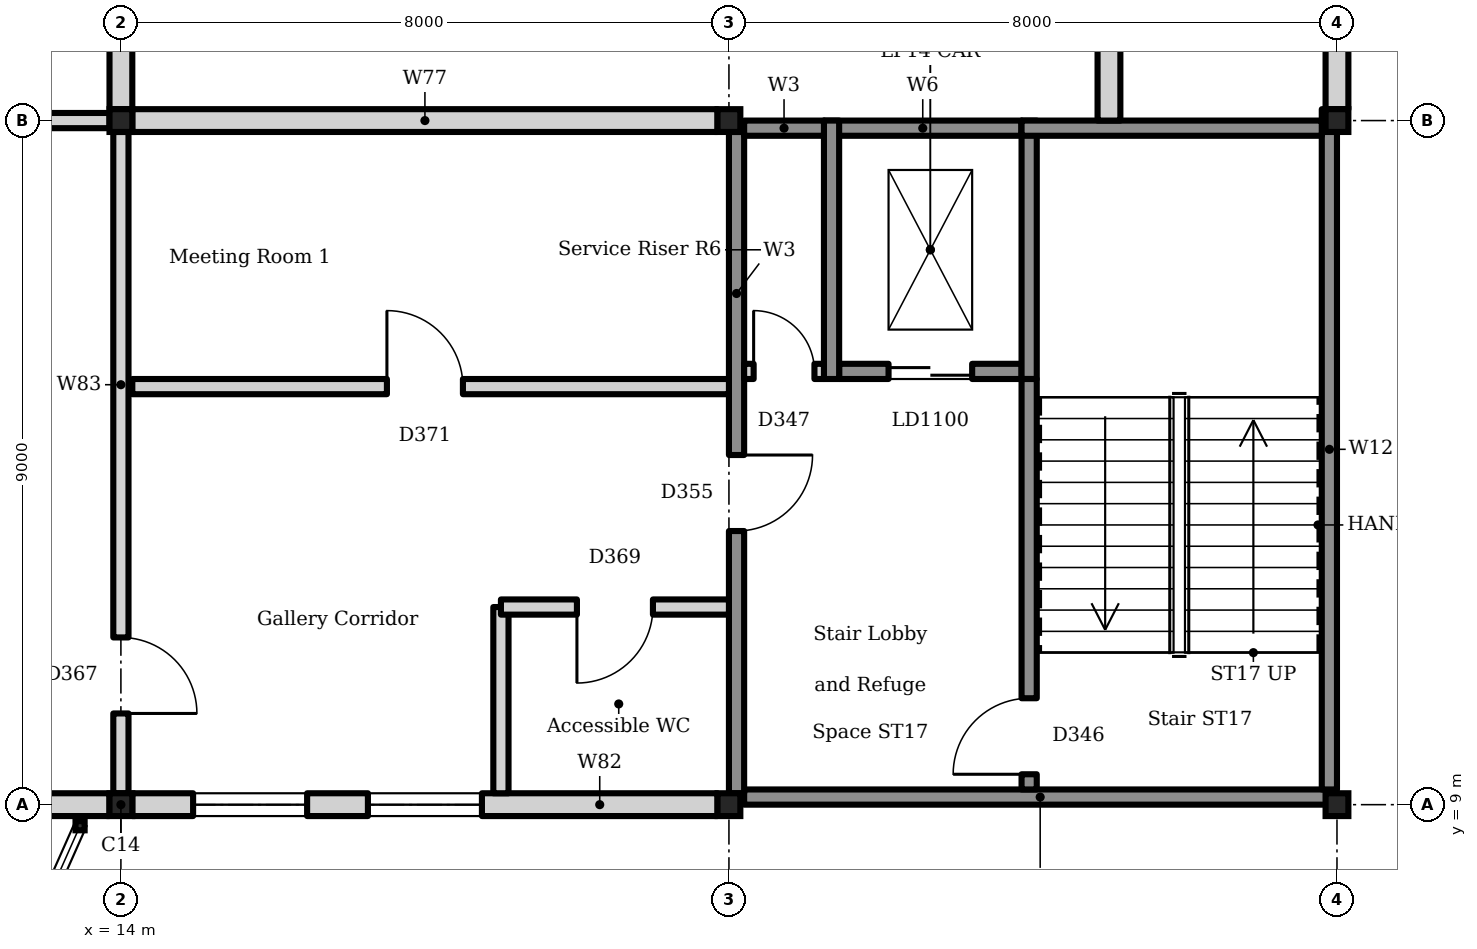
"""IFC4 building model, lengths in metres.
Left out: names, types, materials, properties, quantities, classifications, styles, units other than length and angle.
Written with IfcOpenShell. Run it as: python <this file> out.ifc"""

import sys

from ifc_helpers import new_model, si_unit, direction, frame, frame_2d, origin, origin_2d, place, context, subcontext, project, spatial, rectangle, i_section, extrude, element, fill, save


model = new_model("IFC4")
c1 = context("Model", 3, precision=1e-05, world=origin(), true_north=direction((0.0, 1.0)))
c2 = subcontext(c1, "Body", "Model", "MODEL_VIEW")
j1 = project(units=[si_unit("LENGTHUNIT", "METRE"), si_unit("PLANEANGLEUNIT", "RADIAN")], contexts=[c1])
p1 = place(None, origin())
s1 = spatial("IfcSite", under=j1, at=p1, CompositionType="ELEMENT")
p2 = place(p1, origin())
s2 = spatial("IfcBuilding", under=s1, at=p2, CompositionType="ELEMENT")
p3 = place(p2, frame((0.0, 0.0, 5.4)))
s3 = spatial("IfcBuildingStorey", under=s2, at=p3, CompositionType="ELEMENT", Elevation=5.4)
p4 = place(p3, frame((23.25, 17.9, 0.0), z_axis=(0.0, 0.0, 1.0), x_axis=(1.0, 0.0, 0.0)))
e1 = element("IfcWall", 1, at=p4, inside=s3, PredefinedType="SOLIDWALL", context=c2, shape_type="SweptSolid", body=[
    extrude(rectangle(XDim=2.6, YDim=0.2, at=frame_2d((1.3, 0.0))), origin(), (0.0, 0.0, 1.0), 4.5),
])
p5 = place(p3, frame((23.45, 14.7, 0.0), z_axis=(0.0, 0.0, 1.0), x_axis=(1.0, 0.0, 0.0)))
e2 = element("IfcWall", 2, at=p5, inside=s3, PredefinedType="SOLIDWALL", context=c2, shape_type="SweptSolid", body=[
    extrude(rectangle(XDim=2.4, YDim=0.2, at=frame_2d((1.2, 0.0))), origin(), (0.0, 0.0, 1.0), 4.5),
])
p6 = place(p5, frame((0.65, 0.0, 0.0)))
e3 = element("IfcOpeningElement", 3, at=p6, cuts=e2, PredefinedType="OPENING", context=c2, shape_type="SweptSolid", body=[
    extrude(rectangle(XDim=1.1, YDim=2.1, at=frame_2d((0.55, 1.05))), frame((0.0, 0.11, 0.0), z_axis=(0.0, -1.0, 0.0), x_axis=(1.0, 0.0, 0.0)), (0.0, 0.0, 1.0), 0.22),
])
for number, where, z_axis, x_axis in (
    (4, (23.35, 14.6, 0.0), (0.0, 0.0, 1.0), (0.0, 1.0, 0.0)),
    (5, (25.95, 14.6, 0.0), (0.0, 0.0, 1.0), (0.0, 1.0, 0.0)),
):
    element("IfcWall", number, at=place(p3, frame(where, z_axis=z_axis, x_axis=x_axis)), inside=s3, PredefinedType="SOLIDWALL", context=c2, shape_type="SweptSolid", body=[
        extrude(rectangle(XDim=3.4, YDim=0.2, at=frame_2d((1.7, 0.0))), origin(), (0.0, 0.0, 1.0), 4.5),
    ])
for number, where, z_axis, x_axis in (
    (6, (14.0, 9.0, 0.0), (0.0, 0.0, 1.0), (1.0, 0.0, 0.0)),
    (7, (14.0, 18.0, 0.0), (0.0, 0.0, 1.0), (1.0, 0.0, 0.0)),
    (8, (22.0, 9.0, 0.0), (0.0, 0.0, 1.0), (1.0, 0.0, 0.0)),
    (9, (22.0, 18.0, 0.0), (0.0, 0.0, 1.0), (1.0, 0.0, 0.0)),
    (10, (30.0, 9.0, 0.0), (0.0, 0.0, 1.0), (1.0, 0.0, 0.0)),
    (11, (30.0, 18.0, 0.0), (0.0, 0.0, 1.0), (1.0, 0.0, 0.0)),
):
    element("IfcColumn", number, at=place(p3, frame(where, z_axis=z_axis, x_axis=x_axis)), inside=s3, PredefinedType="COLUMN", context=c2, shape_type="SweptSolid", body=[
        extrude(i_section(OverallWidth=0.3, OverallDepth=0.3, WebThickness=0.011, FlangeThickness=0.019, FilletRadius=0.027, at=origin_2d()), origin(), (0.0, 0.0, 1.0), 4.5),
    ])
p7 = place(p3, frame((6.15, 9.0, 0.0), z_axis=(0.0, 0.0, 1.0), x_axis=(1.0, 0.0, 0.0)))
e12 = element("IfcWall", 12, at=p7, inside=s3, PredefinedType="SOLIDWALL", context=c2, shape_type="SweptSolid", body=[
    extrude(rectangle(XDim=7.7, YDim=0.3, at=frame_2d((3.85, 0.0))), origin(), (0.0, 0.0, 1.0), 3.82),
])
p8 = place(p7, frame((0.8, 0.0, 0.9)))
e13 = element("IfcOpeningElement", 13, at=p8, cuts=e12, PredefinedType="OPENING", context=c2, shape_type="SweptSolid", body=[
    extrude(rectangle(XDim=1.5, YDim=2.8, at=frame_2d((0.75, 1.4))), frame((0.0, 0.16, 0.0), z_axis=(0.0, -1.0, 0.0), x_axis=(1.0, 0.0, 0.0)), (0.0, 0.0, 1.0), 0.32),
])
p9 = place(p7, frame((3.1, 0.0, 0.9)))
e14 = element("IfcOpeningElement", 14, at=p9, cuts=e12, PredefinedType="OPENING", context=c2, shape_type="SweptSolid", body=[
    extrude(rectangle(XDim=1.5, YDim=2.8, at=frame_2d((0.75, 1.4))), frame((0.0, 0.16, 0.0), z_axis=(0.0, -1.0, 0.0), x_axis=(1.0, 0.0, 0.0)), (0.0, 0.0, 1.0), 0.32),
])
p10 = place(p7, frame((5.4, 0.0, 0.9)))
e15 = element("IfcOpeningElement", 15, at=p10, cuts=e12, PredefinedType="OPENING", context=c2, shape_type="SweptSolid", body=[
    extrude(rectangle(XDim=1.5, YDim=2.8, at=frame_2d((0.75, 1.4))), frame((0.0, 0.16, 0.0), z_axis=(0.0, -1.0, 0.0), x_axis=(1.0, 0.0, 0.0)), (0.0, 0.0, 1.0), 0.32),
])
p11 = place(p3, frame((14.15, 9.0, 0.0), z_axis=(0.0, 0.0, 1.0), x_axis=(1.0, 0.0, 0.0)))
e16 = element("IfcWall", 16, at=p11, inside=s3, PredefinedType="SOLIDWALL", context=c2, shape_type="SweptSolid", body=[
    extrude(rectangle(XDim=7.7, YDim=0.3, at=frame_2d((3.85, 0.0))), origin(), (0.0, 0.0, 1.0), 3.82),
])
p12 = place(p11, frame((0.8, 0.0, 0.9)))
e17 = element("IfcOpeningElement", 17, at=p12, cuts=e16, PredefinedType="OPENING", context=c2, shape_type="SweptSolid", body=[
    extrude(rectangle(XDim=1.5, YDim=2.8, at=frame_2d((0.75, 1.4))), frame((0.0, 0.16, 0.0), z_axis=(0.0, -1.0, 0.0), x_axis=(1.0, 0.0, 0.0)), (0.0, 0.0, 1.0), 0.32),
])
p13 = place(p11, frame((3.1, 0.0, 0.9)))
e18 = element("IfcOpeningElement", 18, at=p13, cuts=e16, PredefinedType="OPENING", context=c2, shape_type="SweptSolid", body=[
    extrude(rectangle(XDim=1.5, YDim=2.8, at=frame_2d((0.75, 1.4))), frame((0.0, 0.16, 0.0), z_axis=(0.0, -1.0, 0.0), x_axis=(1.0, 0.0, 0.0)), (0.0, 0.0, 1.0), 0.32),
])
p14 = place(p3, frame((30.0, 18.15, 0.0), z_axis=(0.0, 0.0, 1.0), x_axis=(0.0, 1.0, 0.0)))
e19 = element("IfcWall", 19, at=p14, inside=s3, PredefinedType="SOLIDWALL", context=c2, shape_type="SweptSolid", body=[
    extrude(rectangle(XDim=8.7, YDim=0.3, at=frame_2d((4.35, 0.0))), origin(), (0.0, 0.0, 1.0), 3.72),
])
p15 = place(p14, frame((1.05, 0.0, 1.4)))
e20 = element("IfcOpeningElement", 20, at=p15, cuts=e19, PredefinedType="OPENING", context=c2, shape_type="SweptSolid", body=[
    extrude(rectangle(XDim=1.5, YDim=2.0, at=frame_2d((0.75, 1.0))), frame((0.0, 0.16, 0.0), z_axis=(0.0, -1.0, 0.0), x_axis=(1.0, 0.0, 0.0)), (0.0, 0.0, 1.0), 0.32),
])
p16 = place(p14, frame((3.6, 0.0, 1.4)))
e21 = element("IfcOpeningElement", 21, at=p16, cuts=e19, PredefinedType="OPENING", context=c2, shape_type="SweptSolid", body=[
    extrude(rectangle(XDim=1.5, YDim=2.0, at=frame_2d((0.75, 1.0))), frame((0.0, 0.16, 0.0), z_axis=(0.0, -1.0, 0.0), x_axis=(1.0, 0.0, 0.0)), (0.0, 0.0, 1.0), 0.32),
])
p17 = place(p14, frame((6.15, 0.0, 1.4)))
e22 = element("IfcOpeningElement", 22, at=p17, cuts=e19, PredefinedType="OPENING", context=c2, shape_type="SweptSolid", body=[
    extrude(rectangle(XDim=1.5, YDim=2.0, at=frame_2d((0.75, 1.0))), frame((0.0, 0.16, 0.0), z_axis=(0.0, -1.0, 0.0), x_axis=(1.0, 0.0, 0.0)), (0.0, 0.0, 1.0), 0.32),
])
p18 = place(p3, frame((14.0, 18.15, 0.0), z_axis=(0.0, 0.0, 1.0), x_axis=(0.0, 1.0, 0.0)))
e23 = element("IfcWall", 23, at=p18, inside=s3, PredefinedType="SOLIDWALL", context=c2, shape_type="SweptSolid", body=[
    extrude(rectangle(XDim=8.7, YDim=0.3, at=frame_2d((4.35, 0.0))), origin(), (0.0, 0.0, 1.0), 3.72),
])
p19 = place(p3, frame((14.15, 18.0, 0.0), z_axis=(0.0, 0.0, 1.0), x_axis=(1.0, 0.0, 0.0)))
e24 = element("IfcWall", 24, at=p19, inside=s3, PredefinedType="SOLIDWALL", context=c2, shape_type="SweptSolid", body=[
    extrude(rectangle(XDim=7.7, YDim=0.3, at=frame_2d((3.85, 0.0))), origin(), (0.0, 0.0, 1.0), 3.72),
])
p20 = place(p3, frame((27.0, 18.0, 0.0), z_axis=(0.0, 0.0, 1.0), x_axis=(0.0, 1.0, 0.0)))
e25 = element("IfcWall", 25, at=p20, inside=s3, PredefinedType="SOLIDWALL", context=c2, shape_type="SweptSolid", body=[
    extrude(rectangle(XDim=17.85, YDim=0.3, at=frame_2d((8.925, 0.0))), origin(), (0.0, 0.0, 1.0), 4.3),
])
p21 = place(p3, frame((22.2, 9.1, 0.0), z_axis=(0.0, 0.0, 1.0), x_axis=(1.0, 0.0, 0.0)))
e26 = element("IfcWall", 26, at=p21, inside=s3, PredefinedType="SOLIDWALL", context=c2, shape_type="SweptSolid", body=[
    extrude(rectangle(XDim=7.79, YDim=0.2, at=frame_2d((3.895, 0.0))), origin(), (0.0, 0.0, 1.0), 4.3),
])
p22 = place(p3, frame((29.9, 9.2, 0.0), z_axis=(0.0, 0.0, 1.0), x_axis=(0.0, 1.0, 0.0)))
e27 = element("IfcWall", 27, at=p22, inside=s3, PredefinedType="SOLIDWALL", context=c2, shape_type="SweptSolid", body=[
    extrude(rectangle(XDim=8.95, YDim=0.2, at=frame_2d((4.475, 0.0))), origin(), (0.0, 0.0, 1.0), 4.3),
])
p23 = place(p3, frame((22.1, 9.15, 0.0), z_axis=(0.0, 0.0, 1.0), x_axis=(0.0, 1.0, 0.0)))
e28 = element("IfcWall", 28, at=p23, inside=s3, PredefinedType="SOLIDWALL", context=c2, shape_type="SweptSolid", body=[
    extrude(rectangle(XDim=8.7, YDim=0.2, at=frame_2d((4.35, 0.0))), origin(), (0.0, 0.0, 1.0), 4.3),
])
p24 = place(p23, frame((3.45, 0.0, 0.0)))
e29 = element("IfcOpeningElement", 29, at=p24, cuts=e28, PredefinedType="OPENING", context=c2, shape_type="SweptSolid", body=[
    extrude(rectangle(XDim=1.0, YDim=2.1, at=frame_2d((0.5, 1.05))), frame((0.0, 0.11, 0.0), z_axis=(0.0, -1.0, 0.0), x_axis=(1.0, 0.0, 0.0)), (0.0, 0.0, 1.0), 0.22),
])
p25 = place(p3, frame((22.2, 17.9, 0.0), z_axis=(0.0, 0.0, 1.0), x_axis=(1.0, 0.0, 0.0)))
e30 = element("IfcWall", 30, at=p25, inside=s3, PredefinedType="SOLIDWALL", context=c2, shape_type="SweptSolid", body=[
    extrude(rectangle(XDim=1.05, YDim=0.2, at=frame_2d((0.525, 0.0))), origin(), (0.0, 0.0, 1.0), 4.3),
])
p26 = place(p3, frame((25.85, 17.9, 0.0), z_axis=(0.0, 0.0, 1.0), x_axis=(1.0, 0.0, 0.0)))
e31 = element("IfcWall", 31, at=p26, inside=s3, PredefinedType="SOLIDWALL", context=c2, shape_type="SweptSolid", body=[
    extrude(rectangle(XDim=3.95, YDim=0.2, at=frame_2d((1.975, 0.0))), origin(), (0.0, 0.0, 1.0), 4.3),
])
p27 = place(p3, frame((25.95, 9.2, 0.0), z_axis=(0.0, 0.0, 1.0), x_axis=(0.0, 1.0, 0.0)))
e32 = element("IfcWall", 32, at=p27, inside=s3, PredefinedType="SOLIDWALL", context=c2, shape_type="SweptSolid", body=[
    extrude(rectangle(XDim=5.4, YDim=0.2, at=frame_2d((2.7, 0.0))), origin(), (0.0, 0.0, 1.0), 4.3),
])
p28 = place(p27, frame((0.2, 0.0, 0.0)))
e33 = element("IfcOpeningElement", 33, at=p28, cuts=e32, PredefinedType="OPENING", context=c2, shape_type="SweptSolid", body=[
    extrude(rectangle(XDim=1.0, YDim=2.1, at=frame_2d((0.5, 1.05))), frame((0.0, 0.11, 0.0), z_axis=(0.0, -1.0, 0.0), x_axis=(1.0, 0.0, 0.0)), (0.0, 0.0, 1.0), 0.22),
])
p29 = place(p3, frame((22.2, 14.7, 0.0), z_axis=(0.0, 0.0, 1.0), x_axis=(1.0, 0.0, 0.0)))
e34 = element("IfcWall", 34, at=p29, inside=s3, PredefinedType="SOLIDWALL", context=c2, shape_type="SweptSolid", body=[
    extrude(rectangle(XDim=1.05, YDim=0.2, at=frame_2d((0.525, 0.0))), origin(), (0.0, 0.0, 1.0), 4.3),
])
p30 = place(p29, frame((0.125, 0.0, 0.0)))
e35 = element("IfcOpeningElement", 35, at=p30, cuts=e34, PredefinedType="OPENING", context=c2, shape_type="SweptSolid", body=[
    extrude(rectangle(XDim=0.8, YDim=2.1, at=frame_2d((0.4, 1.05))), frame((0.0, 0.11, 0.0), z_axis=(0.0, -1.0, 0.0), x_axis=(1.0, 0.0, 0.0)), (0.0, 0.0, 1.0), 0.22),
])
p31 = place(p3, frame((6.15, 18.0, 0.0), z_axis=(0.0, 0.0, 1.0), x_axis=(1.0, 0.0, 0.0)))
e36 = element("IfcWall", 36, at=p31, inside=s3, PredefinedType="PARTITIONING", context=c2, shape_type="SweptSolid", body=[
    extrude(rectangle(XDim=7.7, YDim=0.2, at=frame_2d((3.85, 0.0))), origin(), (0.0, 0.0, 1.0), 3.82),
])
p32 = place(p3, frame((14.0, 9.15, 0.0), z_axis=(0.0, 0.0, 1.0), x_axis=(0.0, 1.0, 0.0)))
e37 = element("IfcWall", 37, at=p32, inside=s3, PredefinedType="PARTITIONING", context=c2, shape_type="SweptSolid", body=[
    extrude(rectangle(XDim=8.7, YDim=0.2, at=frame_2d((4.35, 0.0))), origin(), (0.0, 0.0, 1.0), 3.82),
])
p33 = place(p32, frame((1.05, 0.0, 0.0)))
e38 = element("IfcOpeningElement", 38, at=p33, cuts=e37, PredefinedType="OPENING", context=c2, shape_type="SweptSolid", body=[
    extrude(rectangle(XDim=1.0, YDim=2.1, at=frame_2d((0.5, 1.05))), frame((0.0, 0.11, 0.0), z_axis=(0.0, -1.0, 0.0), x_axis=(1.0, 0.0, 0.0)), (0.0, 0.0, 1.0), 0.22),
])
p34 = place(p3, frame((19.0, 9.15, 0.0), z_axis=(0.0, 0.0, 1.0), x_axis=(0.0, 1.0, 0.0)))
e39 = element("IfcWall", 39, at=p34, inside=s3, PredefinedType="PARTITIONING", context=c2, shape_type="SweptSolid", body=[
    extrude(rectangle(XDim=2.45, YDim=0.2, at=frame_2d((1.225, 0.0))), origin(), (0.0, 0.0, 1.0), 4.3),
])
p35 = place(p3, frame((19.0, 11.6, 0.0), z_axis=(0.0, 0.0, 1.0), x_axis=(1.0, 0.0, 0.0)))
e40 = element("IfcWall", 40, at=p35, inside=s3, PredefinedType="PARTITIONING", context=c2, shape_type="SweptSolid", body=[
    extrude(rectangle(XDim=3.0, YDim=0.2, at=frame_2d((1.5, 0.0))), origin(), (0.0, 0.0, 1.0), 4.3),
])
p36 = place(p35, frame((1.0, 0.0, 0.0)))
e41 = element("IfcOpeningElement", 41, at=p36, cuts=e40, PredefinedType="OPENING", context=c2, shape_type="SweptSolid", body=[
    extrude(rectangle(XDim=1.0, YDim=2.1, at=frame_2d((0.5, 1.05))), frame((0.0, 0.11, 0.0), z_axis=(0.0, -1.0, 0.0), x_axis=(1.0, 0.0, 0.0)), (0.0, 0.0, 1.0), 0.22),
])
p37 = place(p3, frame((14.15, 14.5, 0.0), z_axis=(0.0, 0.0, 1.0), x_axis=(1.0, 0.0, 0.0)))
e42 = element("IfcWall", 42, at=p37, inside=s3, PredefinedType="PARTITIONING", context=c2, shape_type="SweptSolid", body=[
    extrude(rectangle(XDim=7.85, YDim=0.2, at=frame_2d((3.925, 0.0))), origin(), (0.0, 0.0, 1.0), 4.3),
])
p38 = place(p37, frame((3.35, 0.0, 0.0)))
e43 = element("IfcOpeningElement", 43, at=p38, cuts=e42, PredefinedType="OPENING", context=c2, shape_type="SweptSolid", body=[
    extrude(rectangle(XDim=1.0, YDim=2.1, at=frame_2d((0.5, 1.05))), frame((0.0, 0.11, 0.0), z_axis=(0.0, -1.0, 0.0), x_axis=(1.0, 0.0, 0.0)), (0.0, 0.0, 1.0), 0.22),
])
p39 = place(p6, origin())
e44 = element("IfcDoor", 44, at=p39, inside=s3, OperationType="SLIDING_TO_LEFT", PredefinedType="DOOR", context=c2, shape_type="SweptSolid", body=[
    extrude(rectangle(XDim=1.1, YDim=2.1, at=frame_2d((0.55, 1.05))), frame((0.0, 0.025, 0.0), z_axis=(0.0, -1.0, 0.0), x_axis=(1.0, 0.0, 0.0)), (0.0, 0.0, 1.0), 0.05),
])
fill(e3, e44)
p40 = place(p12, origin())
e45 = element("IfcWindow", 45, at=p40, inside=s3, PartitioningType="SINGLE_PANEL", PredefinedType="WINDOW", context=c2, shape_type="SweptSolid", body=[
    extrude(rectangle(XDim=1.5, YDim=2.8, at=frame_2d((0.75, 1.4))), frame((0.0, 0.03, 0.0), z_axis=(0.0, -1.0, 0.0), x_axis=(1.0, 0.0, 0.0)), (0.0, 0.0, 1.0), 0.06),
])
fill(e17, e45)
p41 = place(p13, origin())
e46 = element("IfcWindow", 46, at=p41, inside=s3, PartitioningType="SINGLE_PANEL", PredefinedType="WINDOW", context=c2, shape_type="SweptSolid", body=[
    extrude(rectangle(XDim=1.5, YDim=2.8, at=frame_2d((0.75, 1.4))), frame((0.0, 0.03, 0.0), z_axis=(0.0, -1.0, 0.0), x_axis=(1.0, 0.0, 0.0)), (0.0, 0.0, 1.0), 0.06),
])
fill(e18, e46)
p42 = place(p28, origin())
e47 = element("IfcDoor", 47, at=p42, inside=s3, OperationType="SINGLE_SWING_RIGHT", PredefinedType="DOOR", context=c2, shape_type="SweptSolid", body=[
    extrude(rectangle(XDim=1.0, YDim=2.1, at=frame_2d((0.5, 1.05))), frame((0.0, 0.025, 0.0), z_axis=(0.0, -1.0, 0.0), x_axis=(1.0, 0.0, 0.0)), (0.0, 0.0, 1.0), 0.05),
])
fill(e33, e47)
p43 = place(p30, origin())
e48 = element("IfcDoor", 48, at=p43, inside=s3, OperationType="SINGLE_SWING_RIGHT", PredefinedType="DOOR", context=c2, shape_type="SweptSolid", body=[
    extrude(rectangle(XDim=0.8, YDim=2.1, at=frame_2d((0.4, 1.05))), frame((0.0, 0.025, 0.0), z_axis=(0.0, -1.0, 0.0), x_axis=(1.0, 0.0, 0.0)), (0.0, 0.0, 1.0), 0.05),
])
fill(e35, e48)
p44 = place(p24, frame((1.0, 0.0, 0.0), z_axis=(0.0, 0.0, 1.0), x_axis=(-1.0, 0.0, 0.0)))
e49 = element("IfcDoor", 49, at=p44, inside=s3, OperationType="SINGLE_SWING_RIGHT", PredefinedType="DOOR", context=c2, shape_type="SweptSolid", body=[
    extrude(rectangle(XDim=1.0, YDim=2.1, at=frame_2d((0.5, 1.05))), frame((0.0, 0.025, 0.0), z_axis=(0.0, -1.0, 0.0), x_axis=(1.0, 0.0, 0.0)), (0.0, 0.0, 1.0), 0.05),
])
fill(e29, e49)
p45 = place(p33, frame((1.0, 0.0, 0.0), z_axis=(0.0, 0.0, 1.0), x_axis=(-1.0, 0.0, 0.0)))
e50 = element("IfcDoor", 50, at=p45, inside=s3, OperationType="SINGLE_SWING_LEFT", PredefinedType="DOOR", context=c2, shape_type="SweptSolid", body=[
    extrude(rectangle(XDim=1.0, YDim=2.1, at=frame_2d((0.5, 1.05))), frame((0.0, 0.025, 0.0), z_axis=(0.0, -1.0, 0.0), x_axis=(1.0, 0.0, 0.0)), (0.0, 0.0, 1.0), 0.05),
])
fill(e38, e50)
p46 = place(p36, frame((1.0, 0.0, 0.0), z_axis=(0.0, 0.0, 1.0), x_axis=(-1.0, 0.0, 0.0)))
e51 = element("IfcDoor", 51, at=p46, inside=s3, OperationType="SINGLE_SWING_LEFT", PredefinedType="DOOR", context=c2, shape_type="SweptSolid", body=[
    extrude(rectangle(XDim=1.0, YDim=2.1, at=frame_2d((0.5, 1.05))), frame((0.0, 0.025, 0.0), z_axis=(0.0, -1.0, 0.0), x_axis=(1.0, 0.0, 0.0)), (0.0, 0.0, 1.0), 0.05),
])
fill(e41, e51)
p47 = place(p38, origin())
e52 = element("IfcDoor", 52, at=p47, inside=s3, OperationType="SINGLE_SWING_RIGHT", PredefinedType="DOOR", context=c2, shape_type="SweptSolid", body=[
    extrude(rectangle(XDim=1.0, YDim=2.1, at=frame_2d((0.5, 1.05))), frame((0.0, 0.025, 0.0), z_axis=(0.0, -1.0, 0.0), x_axis=(1.0, 0.0, 0.0)), (0.0, 0.0, 1.0), 0.05),
])
fill(e43, e52)
save(model, sys.argv[1])
